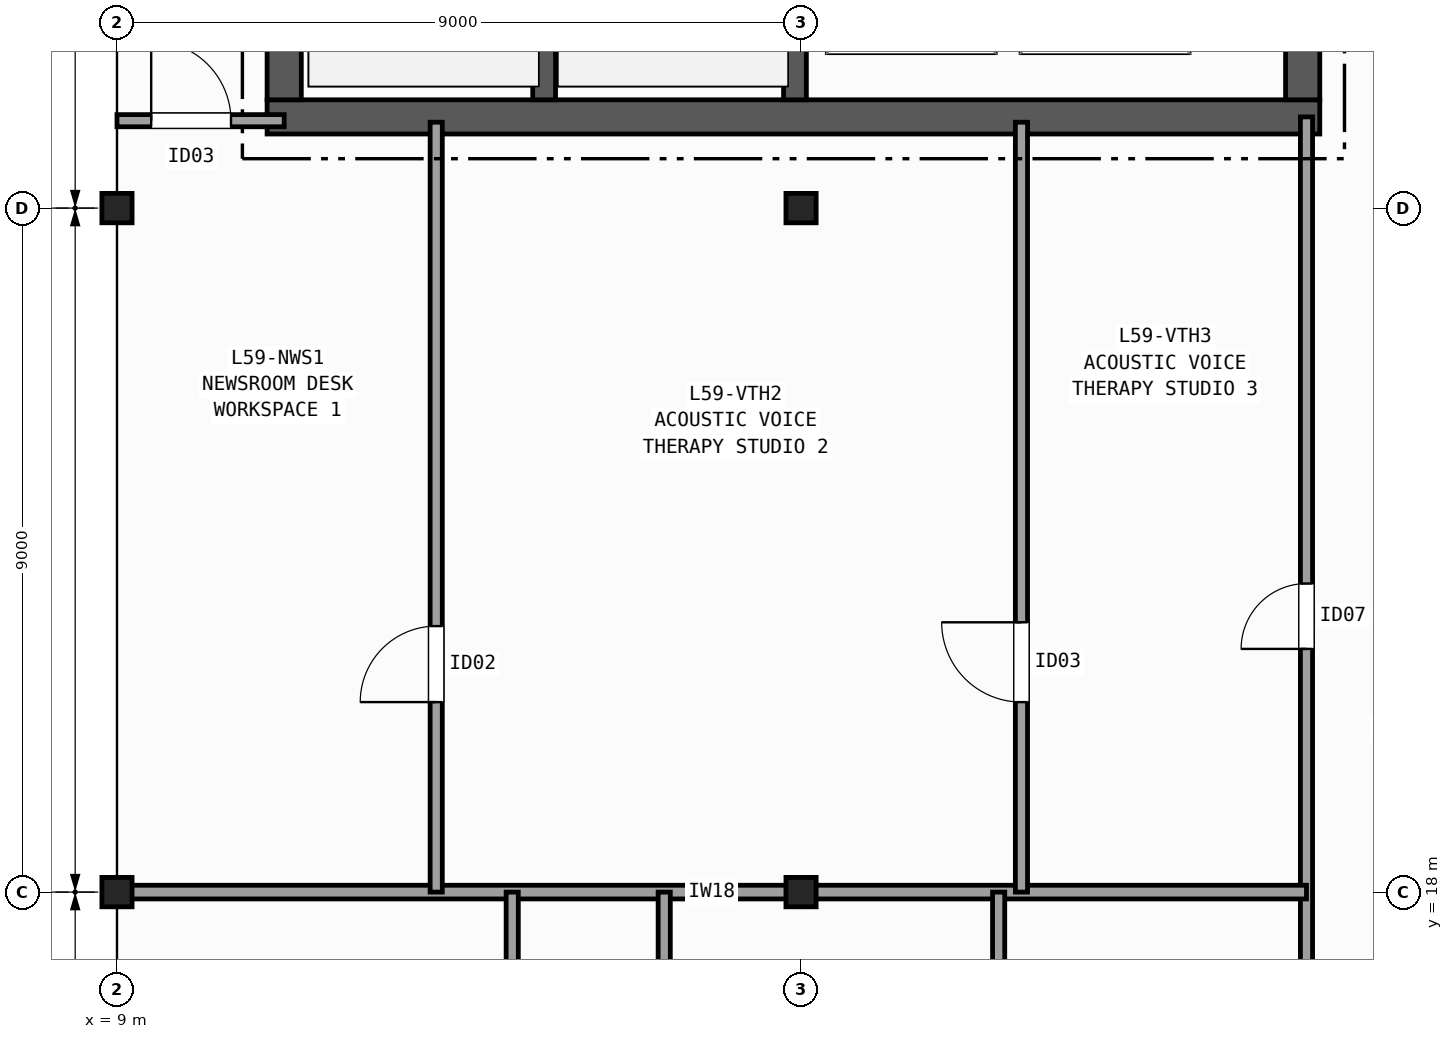
"""IFC4 building model, lengths in metres.
Left out: names, types, materials, properties, quantities, classifications, styles, units other than length and angle.
Written with IfcOpenShell. Run it as: python <this file> out.ifc"""

import sys

from ifc_helpers import new_model, si_unit, direction, frame, frame_2d, origin, origin_2d, place, context, subcontext, project, spatial, rectangle, i_section, extrude, element, fill, save


model = new_model("IFC4")
c1 = context("Model", 3, precision=1e-05, world=origin(), true_north=direction((0.0, 1.0)))
c2 = subcontext(c1, "Body", "Model", "MODEL_VIEW")
j1 = project(units=[si_unit("LENGTHUNIT", "METRE"), si_unit("PLANEANGLEUNIT", "RADIAN")], contexts=[c1])
p1 = place(None, origin())
s1 = spatial("IfcSite", under=j1, at=p1, CompositionType="ELEMENT")
p2 = place(p1, origin())
s2 = spatial("IfcBuilding", under=s1, at=p2, CompositionType="ELEMENT")
p3 = place(p2, frame((0.0, 0.0, 235.8)))
s3 = spatial("IfcBuildingStorey", under=s2, at=p3, CompositionType="ELEMENT", Elevation=235.8)
for number, where, z_axis, x_axis in (
    (1, (9.0, 18.0, 0.0), (0.0, 0.0, 1.0), (1.0, 0.0, 0.0)),
    (2, (9.0, 27.0, 0.0), (0.0, 0.0, 1.0), (1.0, 0.0, 0.0)),
    (3, (18.0, 18.0, 0.0), (0.0, 0.0, 1.0), (1.0, 0.0, 0.0)),
    (4, (18.0, 27.0, 0.0), (0.0, 0.0, 1.0), (1.0, 0.0, 0.0)),
):
    element("IfcColumn", number, at=place(p3, frame(where, z_axis=z_axis, x_axis=x_axis)), inside=s3, PredefinedType="COLUMN", context=c2, shape_type="SweptSolid", body=[
        extrude(i_section(OverallWidth=0.397, OverallDepth=0.387, WebThickness=0.021, FlangeThickness=0.033, FilletRadius=0.015, at=origin_2d()), origin(), (0.0, 0.0, 1.0), 5.0),
    ])
p4 = place(p3, frame((10.975, 28.2, 0.0), z_axis=(0.0, 0.0, 1.0), x_axis=(1.0, 0.0, 0.0)))
e5 = element("IfcWall", 5, at=p4, inside=s3, PredefinedType="SHEAR", context=c2, shape_type="SweptSolid", body=[
    extrude(rectangle(XDim=13.85, YDim=0.45, at=frame_2d((6.925, 0.0))), origin(), (0.0, 0.0, 1.0), 4.72),
])
p5 = place(p3, frame((11.2, 42.175, 0.0), z_axis=(0.0, 0.0, 1.0), x_axis=(0.0, -1.0, 0.0)))
e6 = element("IfcWall", 6, at=p5, inside=s3, PredefinedType="SHEAR", context=c2, shape_type="SweptSolid", body=[
    extrude(rectangle(XDim=13.75, YDim=0.45, at=frame_2d((6.875, 0.0))), origin(), (0.0, 0.0, 1.0), 4.72),
])
p6 = place(p3, frame((24.6, 28.425, 0.0), z_axis=(0.0, 0.0, 1.0), x_axis=(0.0, 1.0, 0.0)))
e7 = element("IfcWall", 7, at=p6, inside=s3, PredefinedType="SHEAR", context=c2, shape_type="SweptSolid", body=[
    extrude(rectangle(XDim=13.75, YDim=0.45, at=frame_2d((6.875, 0.0))), origin(), (0.0, 0.0, 1.0), 4.72),
])
p7 = place(p6, frame((3.375, 0.0, 0.0)))
e8 = element("IfcOpeningElement", 8, at=p7, cuts=e7, PredefinedType="OPENING", context=c2, shape_type="SweptSolid", body=[
    extrude(rectangle(XDim=1.5, YDim=2.2, at=frame_2d((0.75, 1.1))), frame((0.0, 0.235, 0.0), z_axis=(0.0, -1.0, 0.0), x_axis=(1.0, 0.0, 0.0)), (0.0, 0.0, 1.0), 0.47),
])
p8 = place(p6, frame((9.975, 0.0, 0.0)))
e9 = element("IfcOpeningElement", 9, at=p8, cuts=e7, PredefinedType="OPENING", context=c2, shape_type="SweptSolid", body=[
    extrude(rectangle(XDim=0.9, YDim=2.1, at=frame_2d((0.45, 1.05))), frame((0.0, 0.235, 0.0), z_axis=(0.0, -1.0, 0.0), x_axis=(1.0, 0.0, 0.0)), (0.0, 0.0, 1.0), 0.47),
])
p9 = place(p6, frame((12.075, 0.0, 0.0)))
e10 = element("IfcOpeningElement", 10, at=p9, cuts=e7, PredefinedType="OPENING", context=c2, shape_type="SweptSolid", body=[
    extrude(rectangle(XDim=0.9, YDim=2.1, at=frame_2d((0.45, 1.05))), frame((0.0, 0.235, 0.0), z_axis=(0.0, -1.0, 0.0), x_axis=(1.0, 0.0, 0.0)), (0.0, 0.0, 1.0), 0.47),
])
p10 = place(p3, frame((14.62, 28.425, 0.0), z_axis=(0.0, 0.0, 1.0), x_axis=(0.0, 1.0, 0.0)))
e11 = element("IfcWall", 11, at=p10, inside=s3, PredefinedType="SHEAR", context=c2, shape_type="SweptSolid", body=[
    extrude(rectangle(XDim=9.025, YDim=0.3, at=frame_2d((4.512, 0.0))), origin(), (0.0, 0.0, 1.0), 4.72),
])
p11 = place(p3, frame((17.92, 42.175, 0.0), z_axis=(0.0, 0.0, 1.0), x_axis=(0.0, -1.0, 0.0)))
e12 = element("IfcWall", 12, at=p11, inside=s3, PredefinedType="SHEAR", context=c2, shape_type="SweptSolid", body=[
    extrude(rectangle(XDim=13.75, YDim=0.3, at=frame_2d((6.875, 0.0))), origin(), (0.0, 0.0, 1.0), 4.72),
])
p12 = place(p11, frame((2.0, 0.0, 0.0)))
e13 = element("IfcOpeningElement", 13, at=p12, cuts=e12, PredefinedType="OPENING", context=c2, shape_type="SweptSolid", body=[
    extrude(rectangle(XDim=1.15, YDim=2.15, at=frame_2d((0.575, 1.075))), frame((0.0, 0.16, 0.0), z_axis=(0.0, -1.0, 0.0), x_axis=(1.0, 0.0, 0.0)), (0.0, 0.0, 1.0), 0.32),
])
p13 = place(p3, frame((9.0, 28.15, 0.0), z_axis=(0.0, 0.0, 1.0), x_axis=(1.0, 0.0, 0.0)))
e14 = element("IfcWall", 14, at=p13, inside=s3, PredefinedType="PARTITIONING", context=c2, shape_type="SweptSolid", body=[
    extrude(rectangle(XDim=2.2, YDim=0.16, at=frame_2d((1.1, 0.0))), origin(), (0.0, 0.0, 1.0), 4.007),
])
p14 = place(p13, frame((0.45, 0.0, 0.0)))
e15 = element("IfcOpeningElement", 15, at=p14, cuts=e14, PredefinedType="OPENING", context=c2, shape_type="SweptSolid", body=[
    extrude(rectangle(XDim=1.05, YDim=2.15, at=frame_2d((0.525, 1.075))), frame((0.0, 0.09, 0.0), z_axis=(0.0, -1.0, 0.0), x_axis=(1.0, 0.0, 0.0)), (0.0, 0.0, 1.0), 0.18),
])
p15 = place(p3, frame((24.65, 9.0, 0.0), z_axis=(0.0, 0.0, 1.0), x_axis=(0.0, 1.0, 0.0)))
e16 = element("IfcWall", 16, at=p15, inside=s3, PredefinedType="PARTITIONING", context=c2, shape_type="SweptSolid", body=[
    extrude(rectangle(XDim=19.2, YDim=0.16, at=frame_2d((9.6, 0.0))), origin(), (0.0, 0.0, 1.0), 4.007),
])
p16 = place(p15, frame((12.2, 0.0, 0.0)))
e17 = element("IfcOpeningElement", 17, at=p16, cuts=e16, PredefinedType="OPENING", context=c2, shape_type="SweptSolid", body=[
    extrude(rectangle(XDim=0.86, YDim=2.05, at=frame_2d((0.43, 1.025))), frame((0.0, 0.09, 0.0), z_axis=(0.0, -1.0, 0.0), x_axis=(1.0, 0.0, 0.0)), (0.0, 0.0, 1.0), 0.18),
])
p17 = place(p15, frame((4.2, 0.0, 0.0)))
e18 = element("IfcOpeningElement", 18, at=p17, cuts=e16, PredefinedType="OPENING", context=c2, shape_type="SweptSolid", body=[
    extrude(rectangle(XDim=0.95, YDim=2.1, at=frame_2d((0.475, 1.05))), frame((0.0, 0.09, 0.0), z_axis=(0.0, -1.0, 0.0), x_axis=(1.0, 0.0, 0.0)), (0.0, 0.0, 1.0), 0.18),
])
p18 = place(p3, frame((9.0, 18.0, 0.0), z_axis=(0.0, 0.0, 1.0), x_axis=(1.0, 0.0, 0.0)))
e19 = element("IfcWall", 19, at=p18, inside=s3, PredefinedType="PARTITIONING", context=c2, shape_type="SweptSolid", body=[
    extrude(rectangle(XDim=15.65, YDim=0.18, at=frame_2d((7.825, 0.0))), origin(), (0.0, 0.0, 1.0), 4.007),
])
p19 = place(p3, frame((13.2, 18.0, 0.0), z_axis=(0.0, 0.0, 1.0), x_axis=(0.0, 1.0, 0.0)))
e20 = element("IfcWall", 20, at=p19, inside=s3, PredefinedType="PARTITIONING", context=c2, shape_type="SweptSolid", body=[
    extrude(rectangle(XDim=10.13, YDim=0.16, at=frame_2d((5.065, 0.0))), origin(), (0.0, 0.0, 1.0), 4.089),
])
p20 = place(p19, frame((2.5, 0.0, 0.0)))
e21 = element("IfcOpeningElement", 21, at=p20, cuts=e20, PredefinedType="OPENING", context=c2, shape_type="SweptSolid", body=[
    extrude(rectangle(XDim=1.0, YDim=2.1, at=frame_2d((0.5, 1.05))), frame((0.0, 0.09, 0.0), z_axis=(0.0, -1.0, 0.0), x_axis=(1.0, 0.0, 0.0)), (0.0, 0.0, 1.0), 0.18),
])
p21 = place(p3, frame((20.9, 18.0, 0.0), z_axis=(0.0, 0.0, 1.0), x_axis=(0.0, 1.0, 0.0)))
e22 = element("IfcWall", 22, at=p21, inside=s3, PredefinedType="PARTITIONING", context=c2, shape_type="SweptSolid", body=[
    extrude(rectangle(XDim=10.13, YDim=0.16, at=frame_2d((5.065, 0.0))), origin(), (0.0, 0.0, 1.0), 4.089),
])
p22 = place(p21, frame((2.5, 0.0, 0.0)))
e23 = element("IfcOpeningElement", 23, at=p22, cuts=e22, PredefinedType="OPENING", context=c2, shape_type="SweptSolid", body=[
    extrude(rectangle(XDim=1.05, YDim=2.15, at=frame_2d((0.525, 1.075))), frame((0.0, 0.09, 0.0), z_axis=(0.0, -1.0, 0.0), x_axis=(1.0, 0.0, 0.0)), (0.0, 0.0, 1.0), 0.18),
])
p23 = place(p3, frame((14.2, 9.0, 0.0), z_axis=(0.0, 0.0, 1.0), x_axis=(0.0, 1.0, 0.0)))
e24 = element("IfcWall", 24, at=p23, inside=s3, PredefinedType="PARTITIONING", context=c2, shape_type="SweptSolid", body=[
    extrude(rectangle(XDim=9.0, YDim=0.16, at=frame_2d((4.5, 0.0))), origin(), (0.0, 0.0, 1.0), 4.089),
])
p24 = place(p23, frame((3.5, 0.0, 0.0)))
e25 = element("IfcOpeningElement", 25, at=p24, cuts=e24, PredefinedType="OPENING", context=c2, shape_type="SweptSolid", body=[
    extrude(rectangle(XDim=1.2, YDim=2.15, at=frame_2d((0.6, 1.075))), frame((0.0, 0.09, 0.0), z_axis=(0.0, -1.0, 0.0), x_axis=(1.0, 0.0, 0.0)), (0.0, 0.0, 1.0), 0.18),
])
p25 = place(p3, frame((16.2, 8.408, 0.0), z_axis=(0.0, 0.0, 1.0), x_axis=(0.0, 1.0, 0.0)))
e26 = element("IfcWall", 26, at=p25, inside=s3, PredefinedType="PARTITIONING", context=c2, shape_type="SweptSolid", body=[
    extrude(rectangle(XDim=9.592, YDim=0.16, at=frame_2d((4.796, 0.0))), origin(), (0.0, 0.0, 1.0), 4.089),
])
p26 = place(p25, frame((4.092, 0.0, 0.0)))
e27 = element("IfcOpeningElement", 27, at=p26, cuts=e26, PredefinedType="OPENING", context=c2, shape_type="SweptSolid", body=[
    extrude(rectangle(XDim=0.86, YDim=2.05, at=frame_2d((0.43, 1.025))), frame((0.0, 0.09, 0.0), z_axis=(0.0, -1.0, 0.0), x_axis=(1.0, 0.0, 0.0)), (0.0, 0.0, 1.0), 0.18),
])
p27 = place(p3, frame((20.6, 9.0, 0.0), z_axis=(0.0, 0.0, 1.0), x_axis=(0.0, 1.0, 0.0)))
e28 = element("IfcWall", 28, at=p27, inside=s3, PredefinedType="PARTITIONING", context=c2, shape_type="SweptSolid", body=[
    extrude(rectangle(XDim=9.0, YDim=0.16, at=frame_2d((4.5, 0.0))), origin(), (0.0, 0.0, 1.0), 4.007),
])
p28 = place(p27, frame((3.5, 0.0, 0.0)))
e29 = element("IfcOpeningElement", 29, at=p28, cuts=e28, PredefinedType="OPENING", context=c2, shape_type="SweptSolid", body=[
    extrude(rectangle(XDim=0.95, YDim=2.1, at=frame_2d((0.475, 1.05))), frame((0.0, 0.09, 0.0), z_axis=(0.0, -1.0, 0.0), x_axis=(1.0, 0.0, 0.0)), (0.0, 0.0, 1.0), 0.18),
])
p29 = place(p14, origin())
e30 = element("IfcDoor", 30, at=p29, inside=s3, OperationType="SINGLE_SWING_LEFT", PredefinedType="DOOR", context=c2, shape_type="SweptSolid", body=[
    extrude(rectangle(XDim=1.05, YDim=2.15, at=frame_2d((0.525, 1.075))), frame((0.0, 0.025, 0.0), z_axis=(0.0, -1.0, 0.0), x_axis=(1.0, 0.0, 0.0)), (0.0, 0.0, 1.0), 0.05),
])
fill(e15, e30)
p30 = place(p16, origin())
e31 = element("IfcDoor", 31, at=p30, inside=s3, OperationType="SINGLE_SWING_LEFT", PredefinedType="DOOR", context=c2, shape_type="SweptSolid", body=[
    extrude(rectangle(XDim=0.86, YDim=2.05, at=frame_2d((0.43, 1.025))), frame((0.0, 0.025, 0.0), z_axis=(0.0, -1.0, 0.0), x_axis=(1.0, 0.0, 0.0)), (0.0, 0.0, 1.0), 0.05),
])
fill(e17, e31)
p31 = place(p20, origin())
e32 = element("IfcDoor", 32, at=p31, inside=s3, OperationType="SINGLE_SWING_LEFT", PredefinedType="DOOR", context=c2, shape_type="SweptSolid", body=[
    extrude(rectangle(XDim=1.0, YDim=2.1, at=frame_2d((0.5, 1.05))), frame((0.0, 0.025, 0.0), z_axis=(0.0, -1.0, 0.0), x_axis=(1.0, 0.0, 0.0)), (0.0, 0.0, 1.0), 0.05),
])
fill(e21, e32)
p32 = place(p22, origin())
e33 = element("IfcDoor", 33, at=p32, inside=s3, OperationType="SINGLE_SWING_RIGHT", PredefinedType="DOOR", context=c2, shape_type="SweptSolid", body=[
    extrude(rectangle(XDim=1.05, YDim=2.15, at=frame_2d((0.525, 1.075))), frame((0.0, 0.025, 0.0), z_axis=(0.0, -1.0, 0.0), x_axis=(1.0, 0.0, 0.0)), (0.0, 0.0, 1.0), 0.05),
])
fill(e23, e33)
save(model, sys.argv[1])
